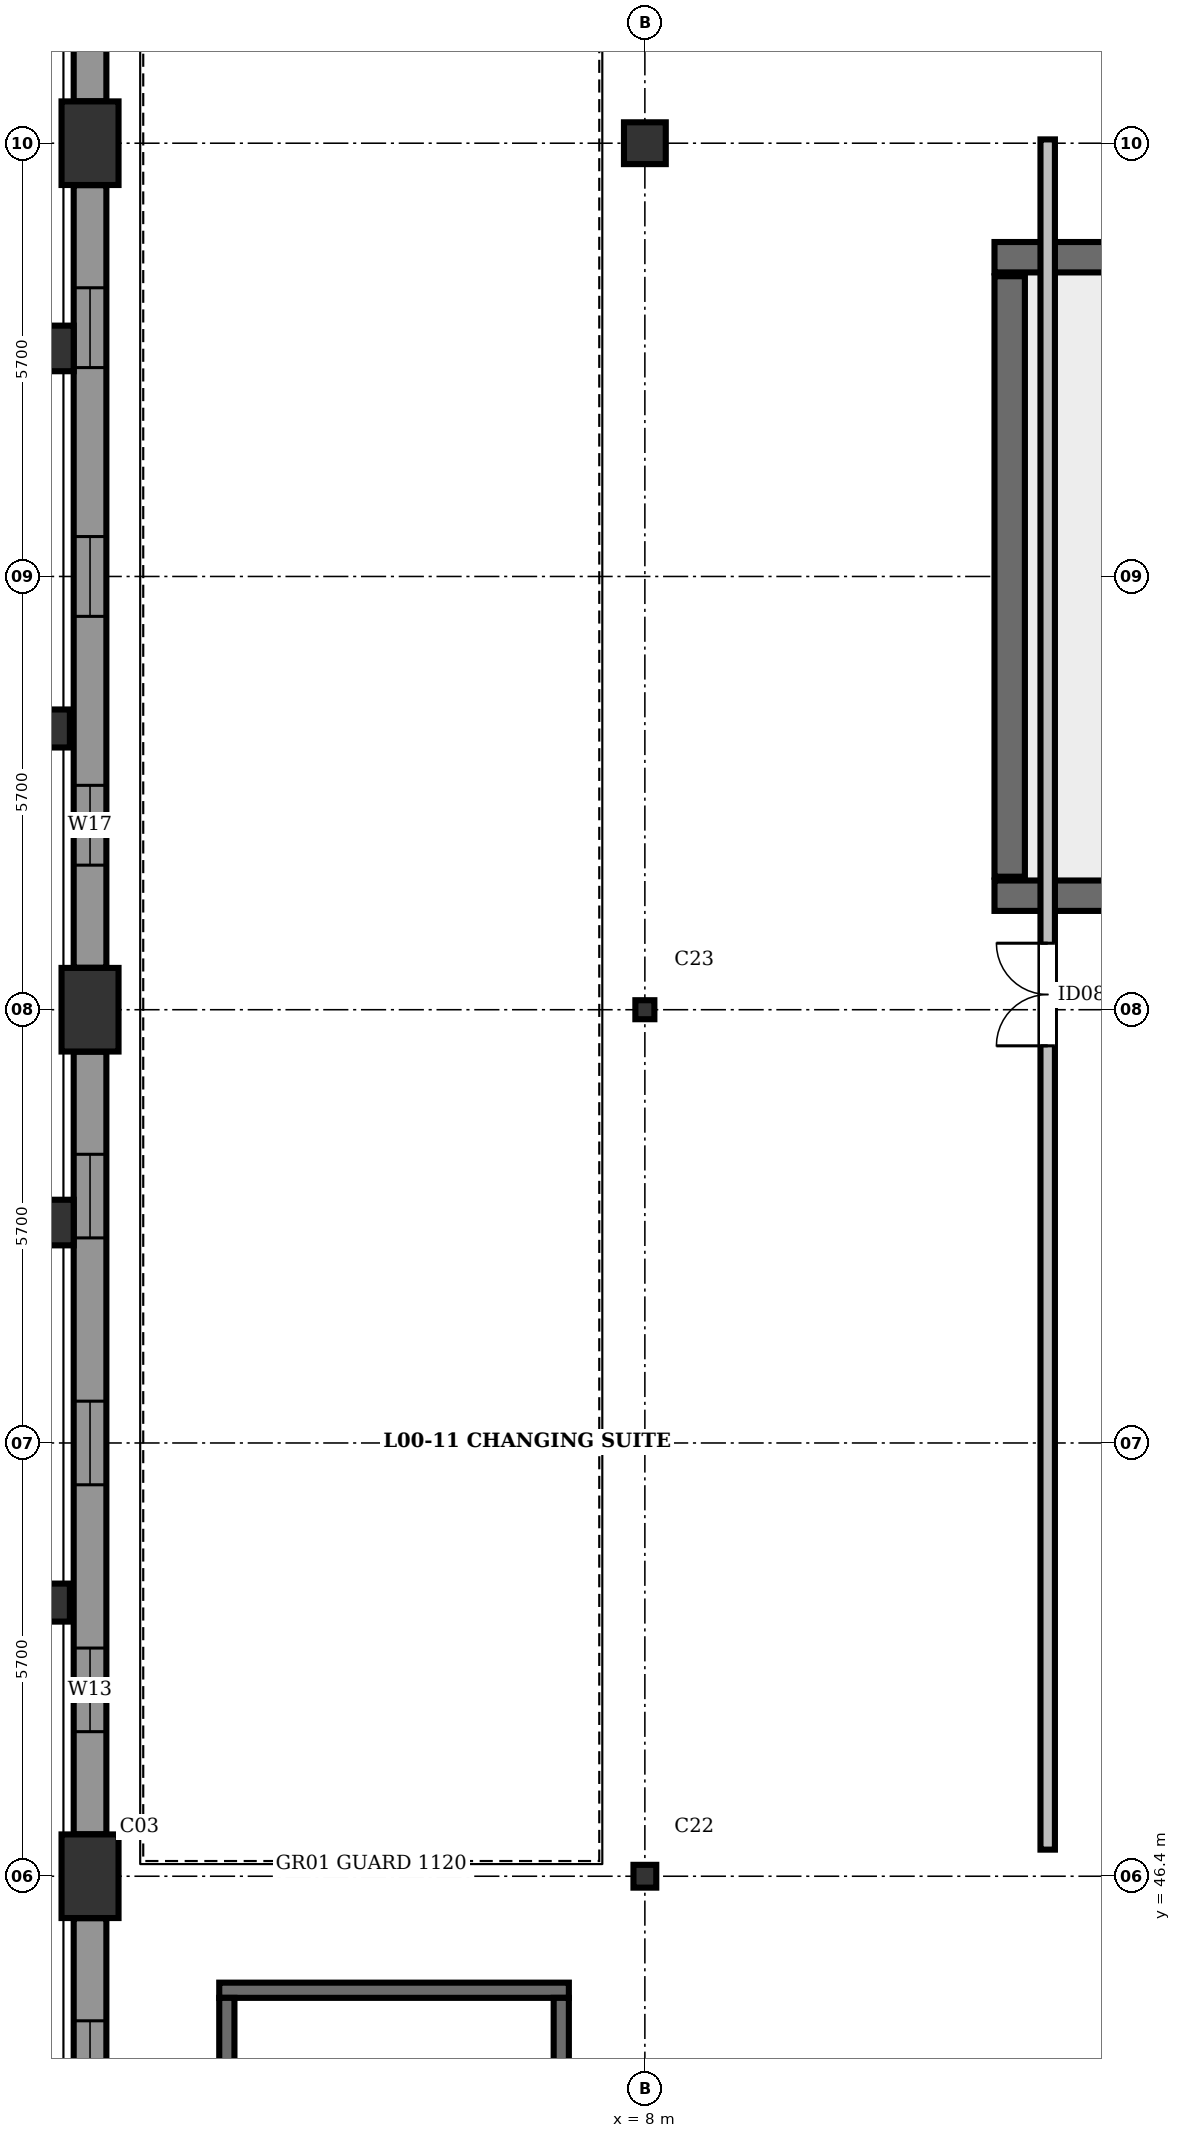
"""IFC4 building model, lengths in metres.
Left out: names, types, materials, properties, quantities, classifications, styles, units other than length and angle.
Written with IfcOpenShell. Run it as: python <this file> out.ifc"""

import sys

from ifc_helpers import new_model, si_unit, direction, frame, frame_2d, origin, origin_2d, place, context, subcontext, project, spatial, rectangle, hollow_rectangle, extrude, element, fill, save


model = new_model("IFC4")
c1 = context("Model", 3, precision=1e-05, world=origin(), true_north=direction((0.0, 1.0)))
c2 = subcontext(c1, "Body", "Model", "MODEL_VIEW")
j1 = project(units=[si_unit("LENGTHUNIT", "METRE"), si_unit("PLANEANGLEUNIT", "RADIAN")], contexts=[c1])
p1 = place(None, origin())
s1 = spatial("IfcSite", under=j1, at=p1, CompositionType="ELEMENT")
p2 = place(p1, origin())
s2 = spatial("IfcBuilding", under=s1, at=p2, CompositionType="ELEMENT")
p3 = place(p2, origin())
s3 = spatial("IfcBuildingStorey", under=s2, at=p3, CompositionType="ELEMENT", Elevation=0.0)
for number, where, z_axis, x_axis in (
    (1, (0.7, 46.4, 0.0), (0.0, 0.0, 1.0), (1.0, 0.0, 0.0)),
    (2, (0.7, 57.8, 0.0), (0.0, 0.0, 1.0), (1.0, 0.0, 0.0)),
    (3, (0.7, 69.2, 0.0), (0.0, 0.0, 1.0), (1.0, 0.0, 0.0)),
):
    element("IfcColumn", number, at=place(p3, frame(where, z_axis=z_axis, x_axis=x_axis)), inside=s3, PredefinedType="COLUMN", context=c2, shape_type="SweptSolid", body=[
        extrude(rectangle(XDim=0.75, YDim=1.1, at=origin_2d()), origin(), (0.0, 0.0, 1.0), 5.4),
    ])
p4 = place(p3, frame((8.0, 46.4, 0.0), z_axis=(0.0, 0.0, 1.0), x_axis=(1.0, 0.0, 0.0)))
e4 = element("IfcColumn", 4, at=p4, inside=s3, PredefinedType="COLUMN", context=c2, shape_type="SweptSolid", body=[
    extrude(hollow_rectangle(XDim=0.3, YDim=0.3, WallThickness=0.012, at=origin_2d()), origin(), (0.0, 0.0, 1.0), 5.4),
])
p5 = place(p3, frame((8.0, 57.8, 0.0), z_axis=(0.0, 0.0, 1.0), x_axis=(1.0, 0.0, 0.0)))
e5 = element("IfcColumn", 5, at=p5, inside=s3, PredefinedType="COLUMN", context=c2, shape_type="SweptSolid", body=[
    extrude(hollow_rectangle(XDim=0.25, YDim=0.25, WallThickness=0.012, at=origin_2d()), origin(), (0.0, 0.0, 1.0), 5.4),
])
p6 = place(p3, frame((8.0, 69.2, 0.0), z_axis=(0.0, 0.0, 1.0), x_axis=(1.0, 0.0, 0.0)))
e6 = element("IfcColumn", 6, at=p6, inside=s3, PredefinedType="COLUMN", context=c2, shape_type="SweptSolid", body=[
    extrude(rectangle(XDim=0.55, YDim=0.55, at=origin_2d()), origin(), (0.0, 0.0, 1.0), 5.4),
])
for number, where, z_axis, x_axis in (
    (7, (12.6, 59.3, -1.45), (0.0, 0.0, 1.0), (1.0, 0.0, 0.0)),
    (8, (12.6, 67.7, -1.45), (0.0, 0.0, 1.0), (1.0, 0.0, 0.0)),
):
    element("IfcWall", number, at=place(p3, frame(where, z_axis=z_axis, x_axis=x_axis)), inside=s3, PredefinedType="SHEAR", context=c2, shape_type="SweptSolid", body=[
        extrude(rectangle(XDim=16.8, YDim=0.4, at=frame_2d((8.4, 0.0))), origin(), (0.0, 0.0, 1.0), 1.17),
    ])
p7 = place(p3, frame((12.8, 59.55, -1.45), z_axis=(0.0, 0.0, 1.0), x_axis=(0.0, 1.0, 0.0)))
e9 = element("IfcWall", 9, at=p7, inside=s3, PredefinedType="SHEAR", context=c2, shape_type="SweptSolid", body=[
    extrude(rectangle(XDim=7.9, YDim=0.4, at=frame_2d((3.95, 0.0))), origin(), (0.0, 0.0, 1.0), 1.17),
])
p8 = place(p3, frame((0.26, 50.0, 0.0), z_axis=(0.0, 0.0, 1.0), x_axis=(1.0, 0.0, 0.0)))
e10 = element("IfcColumn", 10, at=p8, inside=s3, PredefinedType="PILASTER", context=c2, shape_type="SweptSolid", body=[
    extrude(rectangle(XDim=0.35, YDim=0.5, at=origin_2d()), origin(), (0.0, 0.0, 1.0), 5.4),
])
p9 = place(p3, frame((0.26, 55.0, 0.0), z_axis=(0.0, 0.0, 1.0), x_axis=(1.0, 0.0, 0.0)))
e11 = element("IfcColumn", 11, at=p9, inside=s3, PredefinedType="PILASTER", context=c2, shape_type="SweptSolid", body=[
    extrude(rectangle(XDim=0.45, YDim=0.6, at=origin_2d()), origin(), (0.0, 0.0, 1.0), 5.4),
])
p10 = place(p3, frame((0.26, 61.5, 0.0), z_axis=(0.0, 0.0, 1.0), x_axis=(1.0, 0.0, 0.0)))
e12 = element("IfcColumn", 12, at=p10, inside=s3, PredefinedType="PILASTER", context=c2, shape_type="SweptSolid", body=[
    extrude(rectangle(XDim=0.35, YDim=0.5, at=origin_2d()), origin(), (0.0, 0.0, 1.0), 5.4),
])
p11 = place(p3, frame((0.26, 66.5, 0.0), z_axis=(0.0, 0.0, 1.0), x_axis=(1.0, 0.0, 0.0)))
e13 = element("IfcColumn", 13, at=p11, inside=s3, PredefinedType="PILASTER", context=c2, shape_type="SweptSolid", body=[
    extrude(rectangle(XDim=0.45, YDim=0.6, at=origin_2d()), origin(), (0.0, 0.0, 1.0), 5.4),
])
p12 = place(p3, frame((0.7, 35.552, 0.0), z_axis=(0.0, 0.0, 1.0), x_axis=(0.0, 1.0, 0.0)))
e14 = element("IfcWall", 14, at=p12, inside=s3, PredefinedType="STANDARD", context=c2, shape_type="SweptSolid", body=[
    extrude(rectangle(XDim=10.296, YDim=0.43, at=frame_2d((5.148, 0.0))), origin(), (0.0, 0.0, 1.0), 3.485),
])
p13 = place(p12, frame((1.35, 0.0, 0.75)))
e15 = element("IfcOpeningElement", 15, at=p13, cuts=e14, PredefinedType="OPENING", context=c2, shape_type="SweptSolid", body=[
    extrude(rectangle(XDim=1.8, YDim=2.05, at=frame_2d((0.9, 1.025))), frame((0.0, 0.227, 0.0), z_axis=(0.0, -1.0, 0.0), x_axis=(1.0, 0.0, 0.0)), (0.0, 0.0, 1.0), 0.454),
])
p14 = place(p12, frame((4.248, 0.0, 0.75)))
e16 = element("IfcOpeningElement", 16, at=p14, cuts=e14, PredefinedType="OPENING", context=c2, shape_type="SweptSolid", body=[
    extrude(rectangle(XDim=1.8, YDim=2.05, at=frame_2d((0.9, 1.025))), frame((0.0, 0.227, 0.0), z_axis=(0.0, -1.0, 0.0), x_axis=(1.0, 0.0, 0.0)), (0.0, 0.0, 1.0), 0.454),
])
p15 = place(p12, frame((7.146, 0.0, 0.75)))
e17 = element("IfcOpeningElement", 17, at=p15, cuts=e14, PredefinedType="OPENING", context=c2, shape_type="SweptSolid", body=[
    extrude(rectangle(XDim=1.8, YDim=2.05, at=frame_2d((0.9, 1.025))), frame((0.0, 0.227, 0.0), z_axis=(0.0, -1.0, 0.0), x_axis=(1.0, 0.0, 0.0)), (0.0, 0.0, 1.0), 0.454),
])
p16 = place(p3, frame((0.7, 46.952, 0.0), z_axis=(0.0, 0.0, 1.0), x_axis=(0.0, 1.0, 0.0)))
e18 = element("IfcWall", 18, at=p16, inside=s3, PredefinedType="STANDARD", context=c2, shape_type="SweptSolid", body=[
    extrude(rectangle(XDim=10.296, YDim=0.43, at=frame_2d((5.148, 0.0))), origin(), (0.0, 0.0, 1.0), 4.612),
])
p17 = place(p16, frame((1.35, 0.0, 0.75)))
e19 = element("IfcOpeningElement", 19, at=p17, cuts=e18, PredefinedType="OPENING", context=c2, shape_type="SweptSolid", body=[
    extrude(rectangle(XDim=1.1, YDim=1.25, at=frame_2d((0.55, 0.625))), frame((0.0, 0.227, 0.0), z_axis=(0.0, -1.0, 0.0), x_axis=(1.0, 0.0, 0.0)), (0.0, 0.0, 1.0), 0.454),
])
p18 = place(p16, frame((4.598, 0.0, 0.75)))
e20 = element("IfcOpeningElement", 20, at=p18, cuts=e18, PredefinedType="OPENING", context=c2, shape_type="SweptSolid", body=[
    extrude(rectangle(XDim=1.1, YDim=1.25, at=frame_2d((0.55, 0.625))), frame((0.0, 0.227, 0.0), z_axis=(0.0, -1.0, 0.0), x_axis=(1.0, 0.0, 0.0)), (0.0, 0.0, 1.0), 0.454),
])
p19 = place(p16, frame((7.846, 0.0, 0.75)))
e21 = element("IfcOpeningElement", 21, at=p19, cuts=e18, PredefinedType="OPENING", context=c2, shape_type="SweptSolid", body=[
    extrude(rectangle(XDim=1.1, YDim=1.25, at=frame_2d((0.55, 0.625))), frame((0.0, 0.227, 0.0), z_axis=(0.0, -1.0, 0.0), x_axis=(1.0, 0.0, 0.0)), (0.0, 0.0, 1.0), 0.454),
])
p20 = place(p3, frame((0.7, 58.352, 0.0), z_axis=(0.0, 0.0, 1.0), x_axis=(0.0, 1.0, 0.0)))
e22 = element("IfcWall", 22, at=p20, inside=s3, PredefinedType="STANDARD", context=c2, shape_type="SweptSolid", body=[
    extrude(rectangle(XDim=10.296, YDim=0.43, at=frame_2d((5.148, 0.0))), origin(), (0.0, 0.0, 1.0), 4.612),
])
p21 = place(p20, frame((1.35, 0.0, 0.75)))
e23 = element("IfcOpeningElement", 23, at=p21, cuts=e22, PredefinedType="OPENING", context=c2, shape_type="SweptSolid", body=[
    extrude(rectangle(XDim=1.05, YDim=2.35, at=frame_2d((0.525, 1.175))), frame((0.0, 0.227, 0.0), z_axis=(0.0, -1.0, 0.0), x_axis=(1.0, 0.0, 0.0)), (0.0, 0.0, 1.0), 0.454),
])
p22 = place(p20, frame((4.623, 0.0, 0.75)))
e24 = element("IfcOpeningElement", 24, at=p22, cuts=e22, PredefinedType="OPENING", context=c2, shape_type="SweptSolid", body=[
    extrude(rectangle(XDim=1.05, YDim=2.35, at=frame_2d((0.525, 1.175))), frame((0.0, 0.227, 0.0), z_axis=(0.0, -1.0, 0.0), x_axis=(1.0, 0.0, 0.0)), (0.0, 0.0, 1.0), 0.454),
])
p23 = place(p20, frame((7.896, 0.0, 0.75)))
e25 = element("IfcOpeningElement", 25, at=p23, cuts=e22, PredefinedType="OPENING", context=c2, shape_type="SweptSolid", body=[
    extrude(rectangle(XDim=1.05, YDim=2.35, at=frame_2d((0.525, 1.175))), frame((0.0, 0.227, 0.0), z_axis=(0.0, -1.0, 0.0), x_axis=(1.0, 0.0, 0.0)), (0.0, 0.0, 1.0), 0.454),
])
p24 = place(p3, frame((0.7, 69.752, 0.0), z_axis=(0.0, 0.0, 1.0), x_axis=(0.0, 1.0, 0.0)))
e26 = element("IfcWall", 26, at=p24, inside=s3, PredefinedType="STANDARD", context=c2, shape_type="SweptSolid", body=[
    extrude(rectangle(XDim=10.296, YDim=0.43, at=frame_2d((5.148, 0.0))), origin(), (0.0, 0.0, 1.0), 4.612),
])
p25 = place(p24, frame((1.35, 0.0, 0.75)))
e27 = element("IfcOpeningElement", 27, at=p25, cuts=e26, PredefinedType="OPENING", context=c2, shape_type="SweptSolid", body=[
    extrude(rectangle(XDim=0.95, YDim=1.55, at=frame_2d((0.475, 0.775))), frame((0.0, 0.227, 0.0), z_axis=(0.0, -1.0, 0.0), x_axis=(1.0, 0.0, 0.0)), (0.0, 0.0, 1.0), 0.454),
])
p26 = place(p24, frame((4.673, 0.0, 0.75)))
e28 = element("IfcOpeningElement", 28, at=p26, cuts=e26, PredefinedType="OPENING", context=c2, shape_type="SweptSolid", body=[
    extrude(rectangle(XDim=0.95, YDim=1.55, at=frame_2d((0.475, 0.775))), frame((0.0, 0.227, 0.0), z_axis=(0.0, -1.0, 0.0), x_axis=(1.0, 0.0, 0.0)), (0.0, 0.0, 1.0), 0.454),
])
p27 = place(p24, frame((7.996, 0.0, 0.75)))
e29 = element("IfcOpeningElement", 29, at=p27, cuts=e26, PredefinedType="OPENING", context=c2, shape_type="SweptSolid", body=[
    extrude(rectangle(XDim=0.95, YDim=1.55, at=frame_2d((0.475, 0.775))), frame((0.0, 0.227, 0.0), z_axis=(0.0, -1.0, 0.0), x_axis=(1.0, 0.0, 0.0)), (0.0, 0.0, 1.0), 0.454),
])
p28 = place(p3, frame((2.4, 44.9, 0.0), z_axis=(0.0, 0.0, 1.0), x_axis=(1.0, 0.0, 0.0)))
e30 = element("IfcWall", 30, at=p28, inside=s3, PredefinedType="SOLIDWALL", context=c2, shape_type="SweptSolid", body=[
    extrude(rectangle(XDim=4.6, YDim=0.2, at=frame_2d((2.3, 0.0))), origin(), (0.0, 0.0, 1.0), 5.16),
])
p29 = place(p3, frame((2.5, 36.0, 0.0), z_axis=(0.0, 0.0, 1.0), x_axis=(0.0, 1.0, 0.0)))
e31 = element("IfcWall", 31, at=p29, inside=s3, PredefinedType="SOLIDWALL", context=c2, shape_type="SweptSolid", body=[
    extrude(rectangle(XDim=8.8, YDim=0.2, at=frame_2d((4.4, 0.0))), origin(), (0.0, 0.0, 1.0), 5.16),
])
p30 = place(p3, frame((6.9, 36.0, 0.0), z_axis=(0.0, 0.0, 1.0), x_axis=(0.0, 1.0, 0.0)))
e32 = element("IfcWall", 32, at=p30, inside=s3, PredefinedType="SOLIDWALL", context=c2, shape_type="SweptSolid", body=[
    extrude(rectangle(XDim=8.8, YDim=0.2, at=frame_2d((4.4, 0.0))), origin(), (0.0, 0.0, 1.0), 5.16),
])
p31 = place(p30, frame((0.22, 0.0, 0.0)))
e33 = element("IfcOpeningElement", 33, at=p31, cuts=e32, PredefinedType="OPENING", context=c2, shape_type="SweptSolid", body=[
    extrude(rectangle(XDim=1.6, YDim=2.2, at=frame_2d((0.8, 1.1))), frame((0.0, 0.112, 0.0), z_axis=(0.0, -1.0, 0.0), x_axis=(1.0, 0.0, 0.0)), (0.0, 0.0, 1.0), 0.224),
])
p32 = place(p3, frame((13.3, 46.75, 0.0), z_axis=(0.0, 0.0, 1.0), x_axis=(0.0, 1.0, 0.0)))
e34 = element("IfcWall", 34, at=p32, inside=s3, PredefinedType="SOLIDWALL", context=c2, shape_type="SweptSolid", body=[
    extrude(rectangle(XDim=22.5, YDim=0.19, at=frame_2d((11.25, 0.0))), origin(), (0.0, 0.0, 1.0), 4.245),
])
p33 = place(p32, frame((10.575, 0.0, 0.0)))
e35 = element("IfcOpeningElement", 35, at=p33, cuts=e34, PredefinedType="OPENING", context=c2, shape_type="SweptSolid", body=[
    extrude(rectangle(XDim=1.35, YDim=2.2, at=frame_2d((0.675, 1.1))), frame((0.0, 0.107, 0.0), z_axis=(0.0, -1.0, 0.0), x_axis=(1.0, 0.0, 0.0)), (0.0, 0.0, 1.0), 0.214),
])
p34 = place(p15, origin())
e36 = element("IfcWindow", 36, at=p34, inside=s3, PartitioningType="DOUBLE_PANEL_VERTICAL", PredefinedType="WINDOW", context=c2, shape_type="SweptSolid", body=[
    extrude(rectangle(XDim=1.8, YDim=2.05, at=frame_2d((0.9, 1.025))), frame((0.0, 0.08, 0.0), z_axis=(0.0, -1.0, 0.0), x_axis=(1.0, 0.0, 0.0)), (0.0, 0.0, 1.0), 0.06),
])
fill(e17, e36)
p35 = place(p17, origin())
e37 = element("IfcWindow", 37, at=p35, inside=s3, PartitioningType="SINGLE_PANEL", PredefinedType="WINDOW", context=c2, shape_type="SweptSolid", body=[
    extrude(rectangle(XDim=1.1, YDim=1.25, at=frame_2d((0.55, 0.625))), frame((0.0, 0.08, 0.0), z_axis=(0.0, -1.0, 0.0), x_axis=(1.0, 0.0, 0.0)), (0.0, 0.0, 1.0), 0.06),
])
fill(e19, e37)
p36 = place(p18, origin())
e38 = element("IfcWindow", 38, at=p36, inside=s3, PartitioningType="SINGLE_PANEL", PredefinedType="WINDOW", context=c2, shape_type="SweptSolid", body=[
    extrude(rectangle(XDim=1.1, YDim=1.25, at=frame_2d((0.55, 0.625))), frame((0.0, 0.08, 0.0), z_axis=(0.0, -1.0, 0.0), x_axis=(1.0, 0.0, 0.0)), (0.0, 0.0, 1.0), 0.06),
])
fill(e20, e38)
p37 = place(p19, origin())
e39 = element("IfcWindow", 39, at=p37, inside=s3, PartitioningType="SINGLE_PANEL", PredefinedType="WINDOW", context=c2, shape_type="SweptSolid", body=[
    extrude(rectangle(XDim=1.1, YDim=1.25, at=frame_2d((0.55, 0.625))), frame((0.0, 0.08, 0.0), z_axis=(0.0, -1.0, 0.0), x_axis=(1.0, 0.0, 0.0)), (0.0, 0.0, 1.0), 0.06),
])
fill(e21, e39)
p38 = place(p21, origin())
e40 = element("IfcWindow", 40, at=p38, inside=s3, PartitioningType="SINGLE_PANEL", PredefinedType="WINDOW", context=c2, shape_type="SweptSolid", body=[
    extrude(rectangle(XDim=1.05, YDim=2.35, at=frame_2d((0.525, 1.175))), frame((0.0, 0.08, 0.0), z_axis=(0.0, -1.0, 0.0), x_axis=(1.0, 0.0, 0.0)), (0.0, 0.0, 1.0), 0.06),
])
fill(e23, e40)
p39 = place(p22, origin())
e41 = element("IfcWindow", 41, at=p39, inside=s3, PartitioningType="SINGLE_PANEL", PredefinedType="WINDOW", context=c2, shape_type="SweptSolid", body=[
    extrude(rectangle(XDim=1.05, YDim=2.35, at=frame_2d((0.525, 1.175))), frame((0.0, 0.08, 0.0), z_axis=(0.0, -1.0, 0.0), x_axis=(1.0, 0.0, 0.0)), (0.0, 0.0, 1.0), 0.06),
])
fill(e24, e41)
p40 = place(p23, origin())
e42 = element("IfcWindow", 42, at=p40, inside=s3, PartitioningType="SINGLE_PANEL", PredefinedType="WINDOW", context=c2, shape_type="SweptSolid", body=[
    extrude(rectangle(XDim=1.05, YDim=2.35, at=frame_2d((0.525, 1.175))), frame((0.0, 0.08, 0.0), z_axis=(0.0, -1.0, 0.0), x_axis=(1.0, 0.0, 0.0)), (0.0, 0.0, 1.0), 0.06),
])
fill(e25, e42)
p41 = place(p33, origin())
e43 = element("IfcDoor", 43, at=p41, inside=s3, OperationType="DOUBLE_DOOR_SINGLE_SWING", PredefinedType="DOOR", context=c2, shape_type="SweptSolid", body=[
    extrude(rectangle(XDim=1.35, YDim=2.2, at=frame_2d((0.675, 1.1))), frame((0.0, 0.025, 0.0), z_axis=(0.0, -1.0, 0.0), x_axis=(1.0, 0.0, 0.0)), (0.0, 0.0, 1.0), 0.05),
])
fill(e35, e43)
save(model, sys.argv[1])
